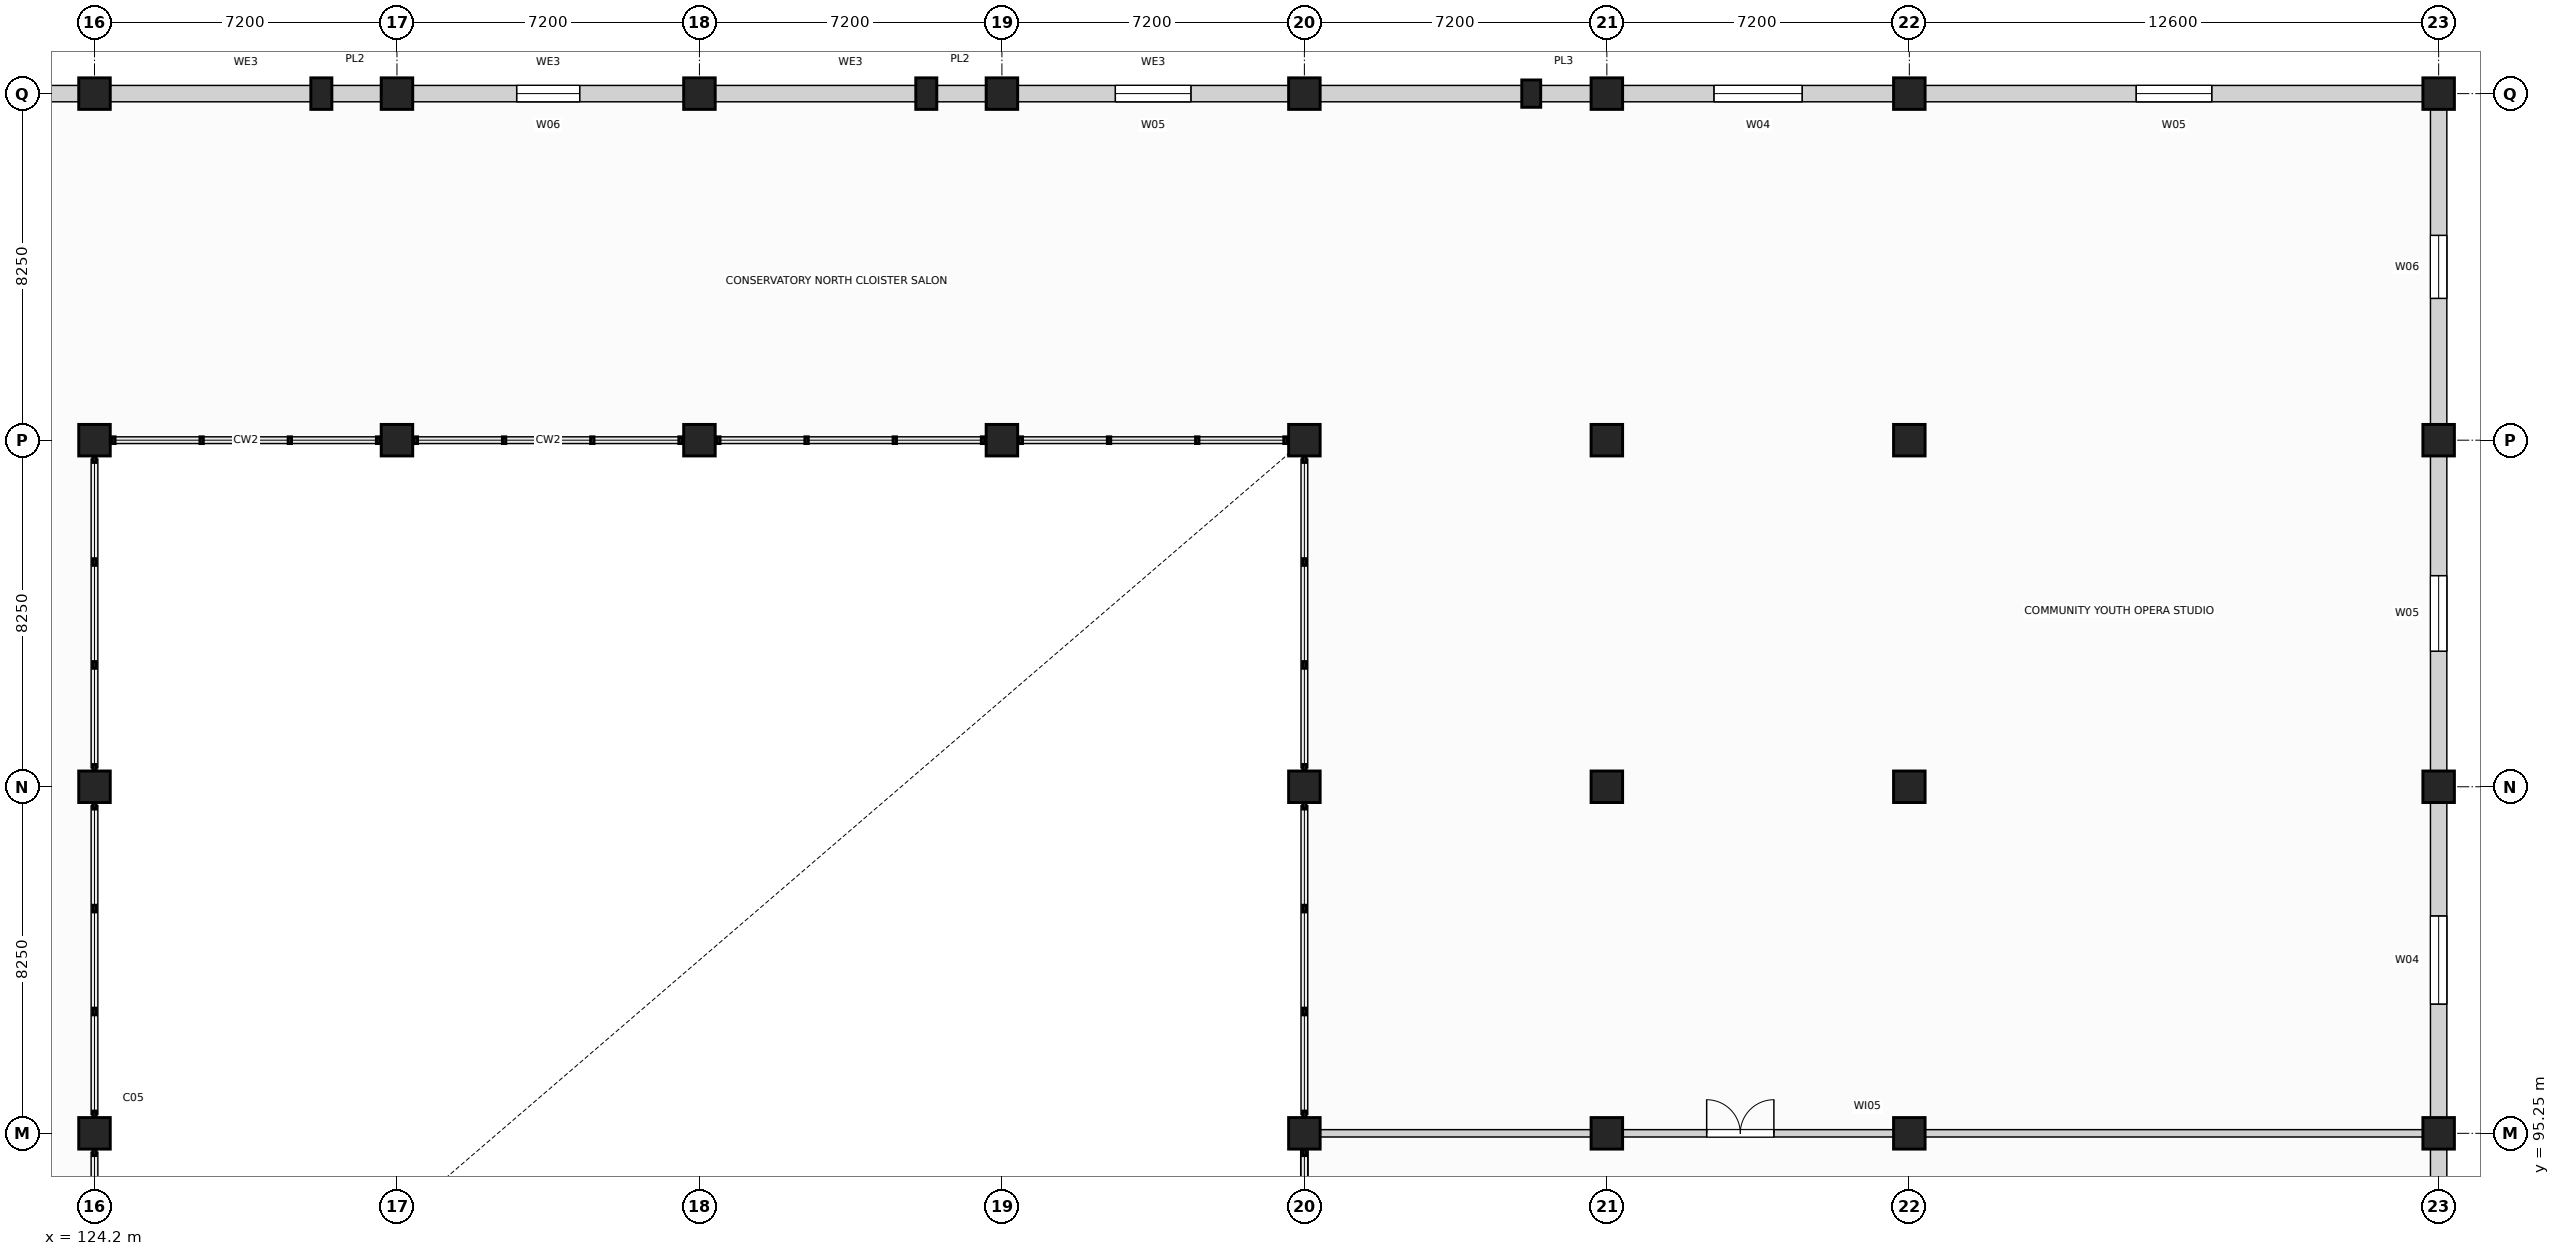
"""IFC4 building model, lengths in metres.
Left out: names, types, materials, properties, quantities, classifications, styles, units other than length and angle.
Written with IfcOpenShell. Run it as: python <this file> out.ifc"""

import sys

from ifc_helpers import new_model, si_unit, direction, frame, frame_2d, origin, origin_2d, place, context, subcontext, project, spatial, rectangle, extrude, element, fill, save


model = new_model("IFC4")
c1 = context("Model", 3, precision=1e-05, world=origin(), true_north=direction((0.0, 1.0)))
c2 = subcontext(c1, "Body", "Model", "MODEL_VIEW")
j1 = project(units=[si_unit("LENGTHUNIT", "METRE"), si_unit("PLANEANGLEUNIT", "RADIAN")], contexts=[c1])
p1 = place(None, origin())
s1 = spatial("IfcSite", under=j1, at=p1, CompositionType="ELEMENT")
p2 = place(p1, origin())
s2 = spatial("IfcBuilding", under=s1, at=p2, CompositionType="ELEMENT")
p3 = place(p2, origin())
s3 = spatial("IfcBuildingStorey", under=s2, at=p3, CompositionType="ELEMENT", Elevation=0.0)
for number, where, z_axis, x_axis in (
    (1, (124.2, 95.25, 0.0), (0.0, 0.0, 1.0), (1.0, 0.0, 0.0)),
    (2, (124.2, 103.5, 0.0), (0.0, 0.0, 1.0), (1.0, 0.0, 0.0)),
    (3, (124.2, 111.75, 0.0), (0.0, 0.0, 1.0), (1.0, 0.0, 0.0)),
    (4, (124.2, 120.0, 0.0), (0.0, 0.0, 1.0), (1.0, 0.0, 0.0)),
    (5, (131.4, 111.75, 0.0), (0.0, 0.0, 1.0), (1.0, 0.0, 0.0)),
    (6, (131.4, 120.0, 0.0), (0.0, 0.0, 1.0), (1.0, 0.0, 0.0)),
    (7, (138.6, 111.75, 0.0), (0.0, 0.0, 1.0), (1.0, 0.0, 0.0)),
    (8, (138.6, 120.0, 0.0), (0.0, 0.0, 1.0), (1.0, 0.0, 0.0)),
    (9, (145.8, 111.75, 0.0), (0.0, 0.0, 1.0), (1.0, 0.0, 0.0)),
    (10, (145.8, 120.0, 0.0), (0.0, 0.0, 1.0), (1.0, 0.0, 0.0)),
    (11, (153.0, 95.25, 0.0), (0.0, 0.0, 1.0), (1.0, 0.0, 0.0)),
    (12, (153.0, 103.5, 0.0), (0.0, 0.0, 1.0), (1.0, 0.0, 0.0)),
    (13, (153.0, 111.75, 0.0), (0.0, 0.0, 1.0), (1.0, 0.0, 0.0)),
    (14, (153.0, 120.0, 0.0), (0.0, 0.0, 1.0), (1.0, 0.0, 0.0)),
    (15, (160.2, 95.25, 0.0), (0.0, 0.0, 1.0), (1.0, 0.0, 0.0)),
    (16, (160.2, 103.5, 0.0), (0.0, 0.0, 1.0), (1.0, 0.0, 0.0)),
    (17, (160.2, 111.75, 0.0), (0.0, 0.0, 1.0), (1.0, 0.0, 0.0)),
    (18, (160.2, 120.0, 0.0), (0.0, 0.0, 1.0), (1.0, 0.0, 0.0)),
    (19, (167.4, 95.25, 0.0), (0.0, 0.0, 1.0), (1.0, 0.0, 0.0)),
    (20, (167.4, 103.5, 0.0), (0.0, 0.0, 1.0), (1.0, 0.0, 0.0)),
    (21, (167.4, 111.75, 0.0), (0.0, 0.0, 1.0), (1.0, 0.0, 0.0)),
    (22, (167.4, 120.0, 0.0), (0.0, 0.0, 1.0), (1.0, 0.0, 0.0)),
    (23, (180.0, 95.25, 0.0), (0.0, 0.0, 1.0), (1.0, 0.0, 0.0)),
    (24, (180.0, 103.5, 0.0), (0.0, 0.0, 1.0), (1.0, 0.0, 0.0)),
    (25, (180.0, 111.75, 0.0), (0.0, 0.0, 1.0), (1.0, 0.0, 0.0)),
    (26, (180.0, 120.0, 0.0), (0.0, 0.0, 1.0), (1.0, 0.0, 0.0)),
):
    element("IfcColumn", number, at=place(p3, frame(where, z_axis=z_axis, x_axis=x_axis)), inside=s3, PredefinedType="COLUMN", context=c2, shape_type="SweptSolid", body=[
        extrude(rectangle(XDim=0.75, YDim=0.75, at=origin_2d()), origin(), (0.0, 0.0, 1.0), 6.0),
    ])
for number, where, z_axis, x_axis in (
    (27, (129.6, 120.0, 0.0), (0.0, 0.0, 1.0), (1.0, 0.0, 0.0)),
    (28, (144.0, 120.0, 0.0), (0.0, 0.0, 1.0), (1.0, 0.0, 0.0)),
):
    element("IfcColumn", number, at=place(p3, frame(where, z_axis=z_axis, x_axis=x_axis)), inside=s3, PredefinedType="PILASTER", context=c2, shape_type="SweptSolid", body=[
        extrude(rectangle(XDim=0.5, YDim=0.75, at=origin_2d()), origin(), (0.0, 0.0, 1.0), 5.7),
    ])
p4 = place(p3, frame((158.4, 120.0, 0.0), z_axis=(0.0, 0.0, 1.0), x_axis=(1.0, 0.0, 0.0)))
e29 = element("IfcColumn", 29, at=p4, inside=s3, PredefinedType="PILASTER", context=c2, shape_type="SweptSolid", body=[
    extrude(rectangle(XDim=0.45, YDim=0.65, at=origin_2d()), origin(), (0.0, 0.0, 1.0), 5.7),
])
p5 = place(p3, frame((117.37, 120.0, 0.0), z_axis=(0.0, 0.0, 1.0), x_axis=(1.0, 0.0, 0.0)))
e30 = element("IfcWall", 30, at=p5, inside=s3, PredefinedType="SOLIDWALL", context=c2, shape_type="SweptSolid", body=[
    extrude(rectangle(XDim=6.46, YDim=0.39, at=frame_2d((3.23, 0.0))), origin(), (0.0, 0.0, 1.0), 4.715),
])
p6 = place(p5, frame((2.23, 0.0, 0.0)))
e31 = element("IfcOpeningElement", 31, at=p6, cuts=e30, PredefinedType="OPENING", context=c2, shape_type="SweptSolid", body=[
    extrude(rectangle(XDim=2.0, YDim=2.4, at=frame_2d((1.0, 1.2))), frame((0.0, 0.205, 0.0), z_axis=(0.0, -1.0, 0.0), x_axis=(1.0, 0.0, 0.0)), (0.0, 0.0, 1.0), 0.41),
])
p7 = place(p3, frame((124.57, 120.0, 0.0), z_axis=(0.0, 0.0, 1.0), x_axis=(1.0, 0.0, 0.0)))
e32 = element("IfcWall", 32, at=p7, inside=s3, PredefinedType="SOLIDWALL", context=c2, shape_type="SweptSolid", body=[
    extrude(rectangle(XDim=6.46, YDim=0.39, at=frame_2d((3.23, 0.0))), origin(), (0.0, 0.0, 1.0), 4.915),
])
p8 = place(p3, frame((131.77, 120.0, 0.0), z_axis=(0.0, 0.0, 1.0), x_axis=(1.0, 0.0, 0.0)))
e33 = element("IfcWall", 33, at=p8, inside=s3, PredefinedType="SOLIDWALL", context=c2, shape_type="SweptSolid", body=[
    extrude(rectangle(XDim=6.46, YDim=0.39, at=frame_2d((3.23, 0.0))), origin(), (0.0, 0.0, 1.0), 5.015),
])
p9 = place(p8, frame((2.48, 0.0, 0.9)))
e34 = element("IfcOpeningElement", 34, at=p9, cuts=e33, PredefinedType="OPENING", context=c2, shape_type="SweptSolid", body=[
    extrude(rectangle(XDim=1.5, YDim=2.05, at=frame_2d((0.75, 1.025))), frame((0.0, 0.205, 0.0), z_axis=(0.0, -1.0, 0.0), x_axis=(1.0, 0.0, 0.0)), (0.0, 0.0, 1.0), 0.41),
])
p10 = place(p3, frame((138.97, 120.0, 0.0), z_axis=(0.0, 0.0, 1.0), x_axis=(1.0, 0.0, 0.0)))
e35 = element("IfcWall", 35, at=p10, inside=s3, PredefinedType="SOLIDWALL", context=c2, shape_type="SweptSolid", body=[
    extrude(rectangle(XDim=6.46, YDim=0.39, at=frame_2d((3.23, 0.0))), origin(), (0.0, 0.0, 1.0), 4.965),
])
p11 = place(p3, frame((146.17, 120.0, 0.0), z_axis=(0.0, 0.0, 1.0), x_axis=(1.0, 0.0, 0.0)))
e36 = element("IfcWall", 36, at=p11, inside=s3, PredefinedType="SOLIDWALL", context=c2, shape_type="SweptSolid", body=[
    extrude(rectangle(XDim=6.46, YDim=0.39, at=frame_2d((3.23, 0.0))), origin(), (0.0, 0.0, 1.0), 4.965),
])
p12 = place(p11, frame((2.33, 0.0, 0.9)))
e37 = element("IfcOpeningElement", 37, at=p12, cuts=e36, PredefinedType="OPENING", context=c2, shape_type="SweptSolid", body=[
    extrude(rectangle(XDim=1.8, YDim=2.3, at=frame_2d((0.9, 1.15))), frame((0.0, 0.205, 0.0), z_axis=(0.0, -1.0, 0.0), x_axis=(1.0, 0.0, 0.0)), (0.0, 0.0, 1.0), 0.41),
])
p13 = place(p3, frame((153.37, 120.0, 0.0), z_axis=(0.0, 0.0, 1.0), x_axis=(1.0, 0.0, 0.0)))
e38 = element("IfcWall", 38, at=p13, inside=s3, PredefinedType="SOLIDWALL", context=c2, shape_type="SweptSolid", body=[
    extrude(rectangle(XDim=6.46, YDim=0.39, at=frame_2d((3.23, 0.0))), origin(), (0.0, 0.0, 1.0), 4.965),
])
p14 = place(p3, frame((160.57, 120.0, 0.0), z_axis=(0.0, 0.0, 1.0), x_axis=(1.0, 0.0, 0.0)))
e39 = element("IfcWall", 39, at=p14, inside=s3, PredefinedType="SOLIDWALL", context=c2, shape_type="SweptSolid", body=[
    extrude(rectangle(XDim=6.46, YDim=0.39, at=frame_2d((3.23, 0.0))), origin(), (0.0, 0.0, 1.0), 5.015),
])
p15 = place(p14, frame((2.18, 0.0, 0.9)))
e40 = element("IfcOpeningElement", 40, at=p15, cuts=e39, PredefinedType="OPENING", context=c2, shape_type="SweptSolid", body=[
    extrude(rectangle(XDim=2.1, YDim=2.5, at=frame_2d((1.05, 1.25))), frame((0.0, 0.205, 0.0), z_axis=(0.0, -1.0, 0.0), x_axis=(1.0, 0.0, 0.0)), (0.0, 0.0, 1.0), 0.41),
])
p16 = place(p3, frame((167.77, 120.0, 0.0), z_axis=(0.0, 0.0, 1.0), x_axis=(1.0, 0.0, 0.0)))
e41 = element("IfcWall", 41, at=p16, inside=s3, PredefinedType="SOLIDWALL", context=c2, shape_type="SweptSolid", body=[
    extrude(rectangle(XDim=11.86, YDim=0.39, at=frame_2d((5.93, 0.0))), origin(), (0.0, 0.0, 1.0), 5.065),
])
p17 = place(p16, frame((5.03, 0.0, 0.9)))
e42 = element("IfcOpeningElement", 42, at=p17, cuts=e41, PredefinedType="OPENING", context=c2, shape_type="SweptSolid", body=[
    extrude(rectangle(XDim=1.8, YDim=2.3, at=frame_2d((0.9, 1.15))), frame((0.0, 0.205, 0.0), z_axis=(0.0, -1.0, 0.0), x_axis=(1.0, 0.0, 0.0)), (0.0, 0.0, 1.0), 0.41),
])
p18 = place(p3, frame((180.0, 94.88, 0.0), z_axis=(0.0, 0.0, 1.0), x_axis=(0.0, -1.0, 0.0)))
e43 = element("IfcWall", 43, at=p18, inside=s3, PredefinedType="SOLIDWALL", context=c2, shape_type="SweptSolid", body=[
    extrude(rectangle(XDim=7.51, YDim=0.39, at=frame_2d((3.755, 0.0))), origin(), (0.0, 0.0, 1.0), 4.715),
])
p19 = place(p18, frame((3.005, 0.0, 0.9)))
e44 = element("IfcOpeningElement", 44, at=p19, cuts=e43, PredefinedType="OPENING", context=c2, shape_type="SweptSolid", body=[
    extrude(rectangle(XDim=1.5, YDim=2.05, at=frame_2d((0.75, 1.025))), frame((0.0, 0.205, 0.0), z_axis=(0.0, -1.0, 0.0), x_axis=(1.0, 0.0, 0.0)), (0.0, 0.0, 1.0), 0.41),
])
p20 = place(p3, frame((180.0, 103.13, 0.0), z_axis=(0.0, 0.0, 1.0), x_axis=(0.0, -1.0, 0.0)))
e45 = element("IfcWall", 45, at=p20, inside=s3, PredefinedType="SOLIDWALL", context=c2, shape_type="SweptSolid", body=[
    extrude(rectangle(XDim=7.51, YDim=0.39, at=frame_2d((3.755, 0.0))), origin(), (0.0, 0.0, 1.0), 4.715),
])
p21 = place(p20, frame((2.705, 0.0, 0.9)))
e46 = element("IfcOpeningElement", 46, at=p21, cuts=e45, PredefinedType="OPENING", context=c2, shape_type="SweptSolid", body=[
    extrude(rectangle(XDim=2.1, YDim=2.5, at=frame_2d((1.05, 1.25))), frame((0.0, 0.205, 0.0), z_axis=(0.0, -1.0, 0.0), x_axis=(1.0, 0.0, 0.0)), (0.0, 0.0, 1.0), 0.41),
])
p22 = place(p3, frame((180.0, 111.38, 0.0), z_axis=(0.0, 0.0, 1.0), x_axis=(0.0, -1.0, 0.0)))
e47 = element("IfcWall", 47, at=p22, inside=s3, PredefinedType="SOLIDWALL", context=c2, shape_type="SweptSolid", body=[
    extrude(rectangle(XDim=7.51, YDim=0.39, at=frame_2d((3.755, 0.0))), origin(), (0.0, 0.0, 1.0), 4.915),
])
p23 = place(p22, frame((2.855, 0.0, 0.9)))
e48 = element("IfcOpeningElement", 48, at=p23, cuts=e47, PredefinedType="OPENING", context=c2, shape_type="SweptSolid", body=[
    extrude(rectangle(XDim=1.8, YDim=2.3, at=frame_2d((0.9, 1.15))), frame((0.0, 0.205, 0.0), z_axis=(0.0, -1.0, 0.0), x_axis=(1.0, 0.0, 0.0)), (0.0, 0.0, 1.0), 0.41),
])
p24 = place(p3, frame((180.0, 119.63, 0.0), z_axis=(0.0, 0.0, 1.0), x_axis=(0.0, -1.0, 0.0)))
e49 = element("IfcWall", 49, at=p24, inside=s3, PredefinedType="SOLIDWALL", context=c2, shape_type="SweptSolid", body=[
    extrude(rectangle(XDim=7.51, YDim=0.39, at=frame_2d((3.755, 0.0))), origin(), (0.0, 0.0, 1.0), 5.015),
])
p25 = place(p24, frame((3.005, 0.0, 0.9)))
e50 = element("IfcOpeningElement", 50, at=p25, cuts=e49, PredefinedType="OPENING", context=c2, shape_type="SweptSolid", body=[
    extrude(rectangle(XDim=1.5, YDim=2.05, at=frame_2d((0.75, 1.025))), frame((0.0, 0.205, 0.0), z_axis=(0.0, -1.0, 0.0), x_axis=(1.0, 0.0, 0.0)), (0.0, 0.0, 1.0), 0.41),
])
p26 = place(p3, frame((153.0, 69.0, 0.0), z_axis=(0.0, 0.0, 1.0), x_axis=(0.0, 1.0, 0.0)))
e51 = element("IfcWall", 51, at=p26, inside=s3, PredefinedType="PARTITIONING", context=c2, shape_type="SweptSolid", body=[
    extrude(rectangle(XDim=26.25, YDim=0.175, at=frame_2d((13.125, 0.0))), origin(), (0.0, 0.0, 1.0), 4.715),
])
p27 = place(p26, frame((12.325, 0.0, 0.0)))
e52 = element("IfcOpeningElement", 52, at=p27, cuts=e51, PredefinedType="OPENING", context=c2, shape_type="SweptSolid", body=[
    extrude(rectangle(XDim=1.6, YDim=2.25, at=frame_2d((0.8, 1.125))), frame((0.0, 0.097, 0.0), z_axis=(0.0, -1.0, 0.0), x_axis=(1.0, 0.0, 0.0)), (0.0, 0.0, 1.0), 0.195),
])
p28 = place(p3, frame((153.0, 95.25, 0.0), z_axis=(0.0, 0.0, 1.0), x_axis=(1.0, 0.0, 0.0)))
e53 = element("IfcWall", 53, at=p28, inside=s3, PredefinedType="PARTITIONING", context=c2, shape_type="SweptSolid", body=[
    extrude(rectangle(XDim=26.8, YDim=0.175, at=frame_2d((13.4, 0.0))), origin(), (0.0, 0.0, 1.0), 4.715),
])
p29 = place(p28, frame((9.576, 0.0, 0.0)))
e54 = element("IfcOpeningElement", 54, at=p29, cuts=e53, PredefinedType="OPENING", context=c2, shape_type="SweptSolid", body=[
    extrude(rectangle(XDim=1.6, YDim=2.25, at=frame_2d((0.8, 1.125))), frame((0.0, 0.097, 0.0), z_axis=(0.0, -1.0, 0.0), x_axis=(1.0, 0.0, 0.0)), (0.0, 0.0, 1.0), 0.195),
])
p30 = place(p9, origin())
e55 = element("IfcWindow", 55, at=p30, inside=s3, PartitioningType="SINGLE_PANEL", PredefinedType="WINDOW", context=c2, shape_type="SweptSolid", body=[
    extrude(rectangle(XDim=1.5, YDim=2.05, at=frame_2d((0.75, 1.025))), frame((0.0, 0.03, 0.0), z_axis=(0.0, -1.0, 0.0), x_axis=(1.0, 0.0, 0.0)), (0.0, 0.0, 1.0), 0.06),
])
fill(e34, e55)
p31 = place(p12, origin())
e56 = element("IfcWindow", 56, at=p31, inside=s3, PartitioningType="SINGLE_PANEL", PredefinedType="WINDOW", context=c2, shape_type="SweptSolid", body=[
    extrude(rectangle(XDim=1.8, YDim=2.3, at=frame_2d((0.9, 1.15))), frame((0.0, 0.03, 0.0), z_axis=(0.0, -1.0, 0.0), x_axis=(1.0, 0.0, 0.0)), (0.0, 0.0, 1.0), 0.06),
])
fill(e37, e56)
p32 = place(p15, origin())
e57 = element("IfcWindow", 57, at=p32, inside=s3, PartitioningType="SINGLE_PANEL", PredefinedType="WINDOW", context=c2, shape_type="SweptSolid", body=[
    extrude(rectangle(XDim=2.1, YDim=2.5, at=frame_2d((1.05, 1.25))), frame((0.0, 0.03, 0.0), z_axis=(0.0, -1.0, 0.0), x_axis=(1.0, 0.0, 0.0)), (0.0, 0.0, 1.0), 0.06),
])
fill(e40, e57)
p33 = place(p17, origin())
e58 = element("IfcWindow", 58, at=p33, inside=s3, PartitioningType="SINGLE_PANEL", PredefinedType="WINDOW", context=c2, shape_type="SweptSolid", body=[
    extrude(rectangle(XDim=1.8, YDim=2.3, at=frame_2d((0.9, 1.15))), frame((0.0, 0.03, 0.0), z_axis=(0.0, -1.0, 0.0), x_axis=(1.0, 0.0, 0.0)), (0.0, 0.0, 1.0), 0.06),
])
fill(e42, e58)
p34 = place(p21, origin())
e59 = element("IfcWindow", 59, at=p34, inside=s3, PartitioningType="SINGLE_PANEL", PredefinedType="WINDOW", context=c2, shape_type="SweptSolid", body=[
    extrude(rectangle(XDim=2.1, YDim=2.5, at=frame_2d((1.05, 1.25))), frame((0.0, 0.03, 0.0), z_axis=(0.0, -1.0, 0.0), x_axis=(1.0, 0.0, 0.0)), (0.0, 0.0, 1.0), 0.06),
])
fill(e46, e59)
p35 = place(p23, origin())
e60 = element("IfcWindow", 60, at=p35, inside=s3, PartitioningType="SINGLE_PANEL", PredefinedType="WINDOW", context=c2, shape_type="SweptSolid", body=[
    extrude(rectangle(XDim=1.8, YDim=2.3, at=frame_2d((0.9, 1.15))), frame((0.0, 0.03, 0.0), z_axis=(0.0, -1.0, 0.0), x_axis=(1.0, 0.0, 0.0)), (0.0, 0.0, 1.0), 0.06),
])
fill(e48, e60)
p36 = place(p25, origin())
e61 = element("IfcWindow", 61, at=p36, inside=s3, PartitioningType="SINGLE_PANEL", PredefinedType="WINDOW", context=c2, shape_type="SweptSolid", body=[
    extrude(rectangle(XDim=1.5, YDim=2.05, at=frame_2d((0.75, 1.025))), frame((0.0, 0.03, 0.0), z_axis=(0.0, -1.0, 0.0), x_axis=(1.0, 0.0, 0.0)), (0.0, 0.0, 1.0), 0.06),
])
fill(e50, e61)
p37 = place(p29, origin())
e62 = element("IfcDoor", 62, at=p37, inside=s3, OperationType="DOUBLE_DOOR_SINGLE_SWING", PredefinedType="DOOR", context=c2, shape_type="SweptSolid", body=[
    extrude(rectangle(XDim=1.6, YDim=2.25, at=frame_2d((0.8, 1.125))), frame((0.0, 0.025, 0.0), z_axis=(0.0, -1.0, 0.0), x_axis=(1.0, 0.0, 0.0)), (0.0, 0.0, 1.0), 0.05),
])
fill(e54, e62)
save(model, sys.argv[1])
